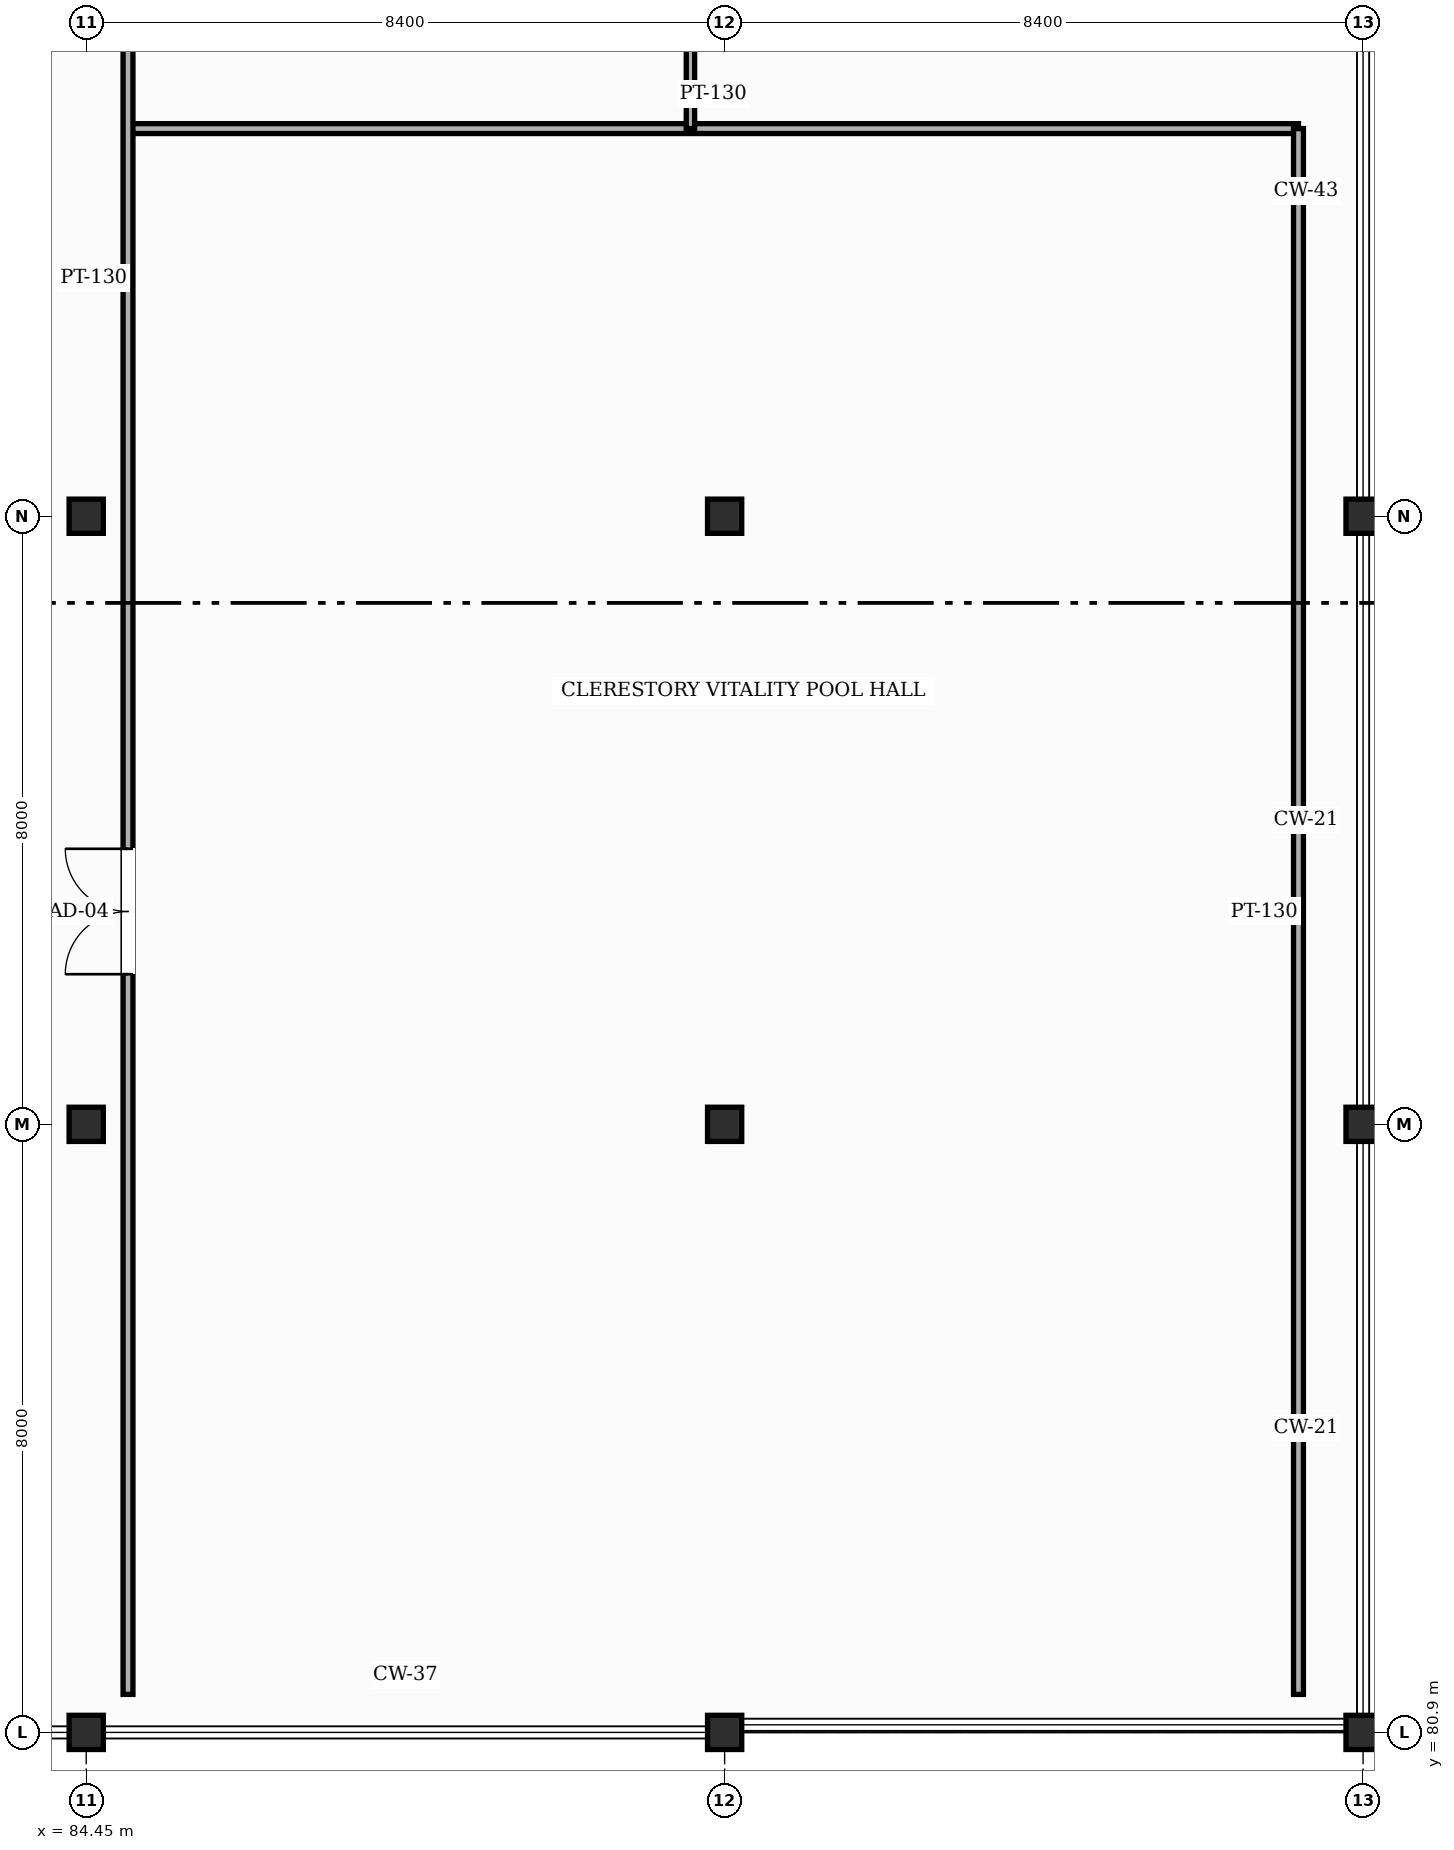
"""IFC4 building model, lengths in metres.
Left out: names, types, materials, properties, quantities, classifications, styles, units other than length and angle.
Written with IfcOpenShell. Run it as: python <this file> out.ifc"""

import sys

from ifc_helpers import new_model, si_unit, direction, frame, frame_2d, origin, origin_2d, place, context, subcontext, project, spatial, rectangle, hollow_rectangle, extrude, element, fill, save


model = new_model("IFC4")
c1 = context("Model", 3, precision=1e-05, world=origin(), true_north=direction((0.0, 1.0)))
c2 = subcontext(c1, "Body", "Model", "MODEL_VIEW")
j1 = project(units=[si_unit("LENGTHUNIT", "METRE"), si_unit("PLANEANGLEUNIT", "RADIAN")], contexts=[c1])
p1 = place(None, origin())
s1 = spatial("IfcSite", under=j1, at=p1, CompositionType="ELEMENT")
p2 = place(p1, origin())
s2 = spatial("IfcBuilding", under=s1, at=p2, CompositionType="ELEMENT")
p3 = place(p2, frame((0.0, 0.0, 5.4)))
s3 = spatial("IfcBuildingStorey", under=s2, at=p3, CompositionType="ELEMENT", Elevation=5.4)
for number, where, z_axis, x_axis in (
    (1, (84.45, 80.9, 0.0), (0.0, 0.0, 1.0), (1.0, 0.0, 0.0)),
    (2, (84.45, 88.9, 0.0), (0.0, 0.0, 1.0), (1.0, 0.0, 0.0)),
    (3, (84.45, 96.9, 0.0), (0.0, 0.0, 1.0), (1.0, 0.0, 0.0)),
    (4, (92.85, 80.9, 0.0), (0.0, 0.0, 1.0), (1.0, 0.0, 0.0)),
    (5, (92.85, 88.9, 0.0), (0.0, 0.0, 1.0), (1.0, 0.0, 0.0)),
    (6, (92.85, 96.9, 0.0), (0.0, 0.0, 1.0), (1.0, 0.0, 0.0)),
    (7, (101.25, 80.9, 0.0), (0.0, 0.0, 1.0), (1.0, 0.0, 0.0)),
    (8, (101.25, 88.9, 0.0), (0.0, 0.0, 1.0), (1.0, 0.0, 0.0)),
    (9, (101.25, 96.9, 0.0), (0.0, 0.0, 1.0), (1.0, 0.0, 0.0)),
):
    element("IfcColumn", number, at=place(p3, frame(where, z_axis=z_axis, x_axis=x_axis)), inside=s3, PredefinedType="COLUMN", context=c2, shape_type="SweptSolid", body=[
        extrude(hollow_rectangle(XDim=0.45, YDim=0.45, WallThickness=0.019, InnerFilletRadius=0.019, OuterFilletRadius=0.038, at=origin_2d()), origin(), (0.0, 0.0, 1.0), 4.8),
    ])
p4 = place(p3, frame((85.0, 102.0, 0.0), z_axis=(0.0, 0.0, 1.0), x_axis=(1.0, 0.0, 0.0)))
e10 = element("IfcWall", 10, at=p4, inside=s3, PredefinedType="PARTITIONING", context=c2, shape_type="SweptSolid", body=[
    extrude(rectangle(XDim=15.4, YDim=0.13, at=frame_2d((7.7, 0.0))), origin(), (0.0, 0.0, 1.0), 4.535),
])
p5 = place(p3, frame((85.0, 81.4, 0.0), z_axis=(0.0, 0.0, 1.0), x_axis=(0.0, 1.0, 0.0)))
e11 = element("IfcWall", 11, at=p5, inside=s3, PredefinedType="PARTITIONING", context=c2, shape_type="SweptSolid", body=[
    extrude(rectangle(XDim=26.0, YDim=0.13, at=frame_2d((13.0, 0.0))), origin(), (0.0, 0.0, 1.0), 4.535),
])
p6 = place(p5, frame((9.475, 0.0, 0.0)))
e12 = element("IfcOpeningElement", 12, at=p6, cuts=e11, PredefinedType="OPENING", context=c2, shape_type="SweptSolid", body=[
    extrude(rectangle(XDim=1.65, YDim=2.35, at=frame_2d((0.825, 1.175))), frame((0.0, 0.075, 0.0), z_axis=(0.0, -1.0, 0.0), x_axis=(1.0, 0.0, 0.0)), (0.0, 0.0, 1.0), 0.15),
])
p7 = place(p3, frame((92.4, 102.0, 0.0), z_axis=(0.0, 0.0, 1.0), x_axis=(0.0, 1.0, 0.0)))
e13 = element("IfcWall", 13, at=p7, inside=s3, PredefinedType="PARTITIONING", context=c2, shape_type="SweptSolid", body=[
    extrude(rectangle(XDim=5.4, YDim=0.11, at=frame_2d((2.7, 0.0))), origin(), (0.0, 0.0, 1.0), 4.535),
])
p8 = place(p3, frame((100.4, 81.4, 0.0), z_axis=(0.0, 0.0, 1.0), x_axis=(0.0, 1.0, 0.0)))
e14 = element("IfcWall", 14, at=p8, inside=s3, PredefinedType="PARTITIONING", context=c2, shape_type="SweptSolid", body=[
    extrude(rectangle(XDim=20.6, YDim=0.13, at=frame_2d((10.3, 0.0))), origin(), (0.0, 0.0, 1.0), 4.535),
])
p9 = place(p6, origin())
e15 = element("IfcDoor", 15, at=p9, inside=s3, OperationType="DOUBLE_DOOR_SINGLE_SWING", PredefinedType="DOOR", context=c2, shape_type="SweptSolid", body=[
    extrude(rectangle(XDim=1.65, YDim=2.35, at=frame_2d((0.825, 1.175))), frame((0.0, 0.025, 0.0), z_axis=(0.0, -1.0, 0.0), x_axis=(1.0, 0.0, 0.0)), (0.0, 0.0, 1.0), 0.05),
])
fill(e12, e15)
save(model, sys.argv[1])
